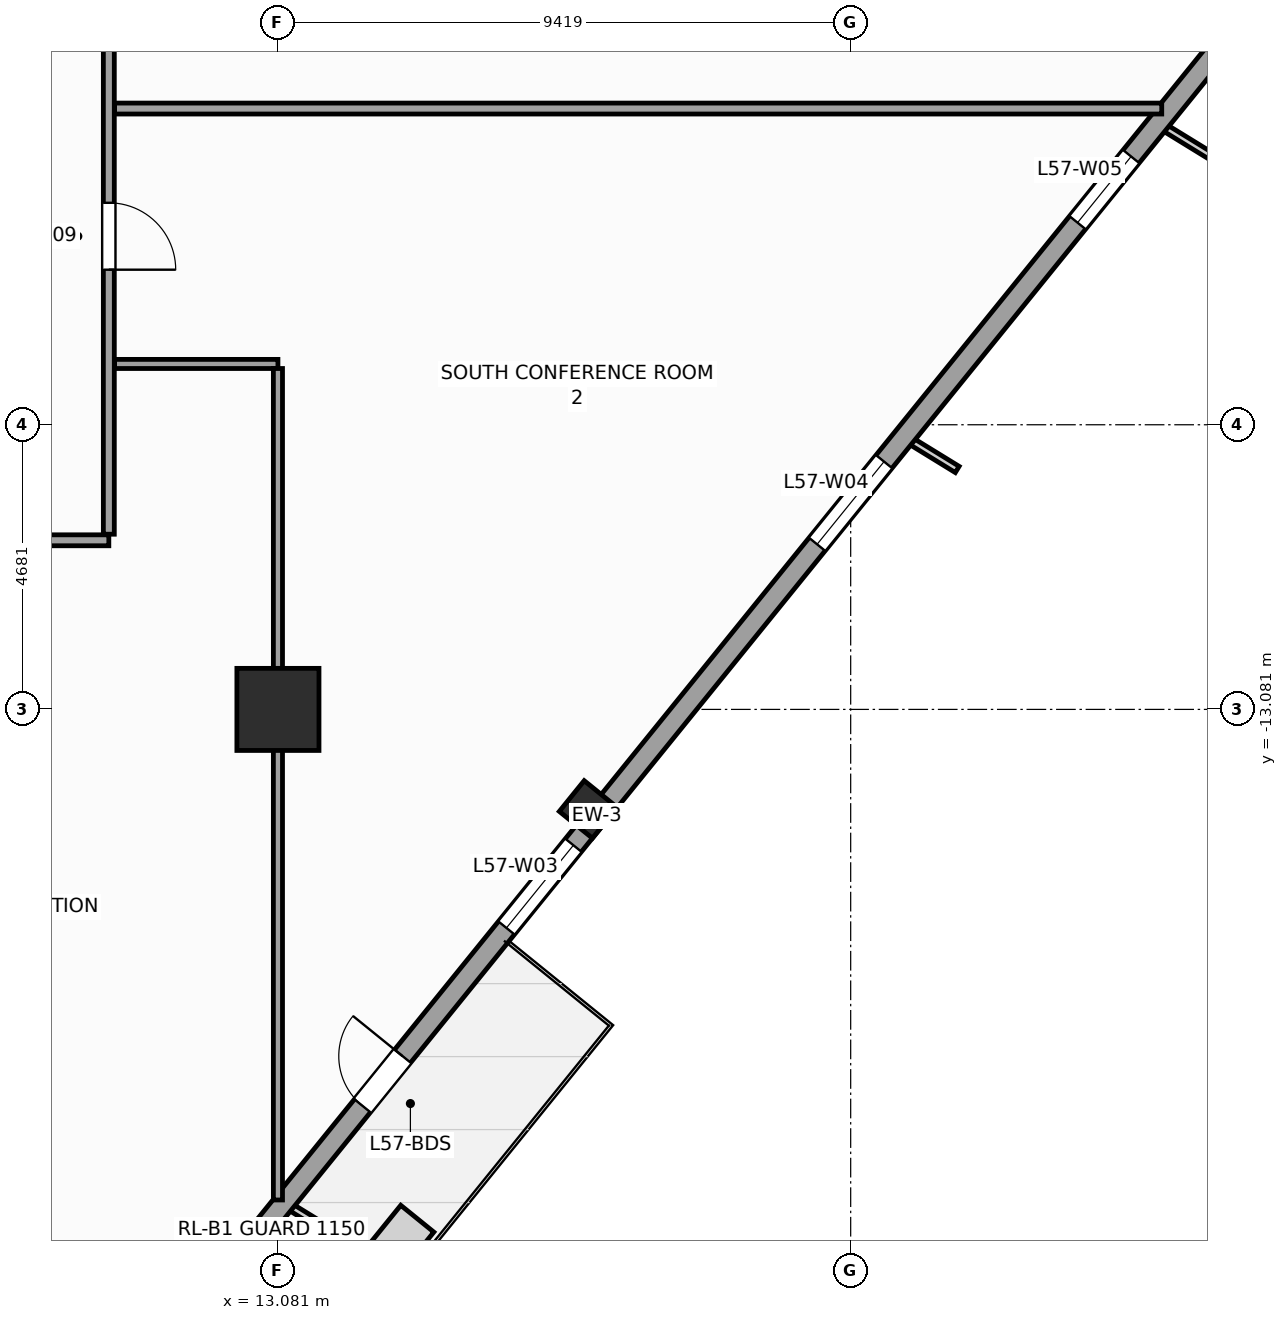
"""IFC4 building model, lengths in metres.
Left out: names, types, materials, properties, quantities, classifications, styles, units other than length and angle.
Written with IfcOpenShell. Run it as: python <this file> out.ifc"""

import sys

from ifc_helpers import new_model, si_unit, direction, frame, frame_2d, origin, origin_2d, place, context, subcontext, project, spatial, rectangle, extrude, source, transform, mapped, element, fill, save


model = new_model("IFC4")
c1 = context("Model", 3, precision=1e-05, world=origin(), true_north=direction((0.0, 1.0)))
c2 = subcontext(c1, "Body", "Model", "MODEL_VIEW")
j1 = project(units=[si_unit("LENGTHUNIT", "METRE"), si_unit("PLANEANGLEUNIT", "RADIAN")], contexts=[c1])
p1 = place(None, origin())
s1 = spatial("IfcSite", under=j1, at=p1, CompositionType="ELEMENT")
p2 = place(p1, origin())
s2 = spatial("IfcBuilding", under=s1, at=p2, CompositionType="ELEMENT")
p3 = place(p2, frame((0.0, 0.0, 236.8)))
s3 = spatial("IfcBuildingStorey", under=s2, at=p3, CompositionType="ELEMENT", Elevation=236.8)
m1 = source(origin(), c2, "Body", "SweptSolid", [
    extrude(rectangle(XDim=1.35, YDim=1.35, at=origin_2d()), origin(), (0.0, 0.0, 1.0), 3.9),
])
p4 = place(p3, frame((13.081, -13.081, 0.0), z_axis=(0.0, 0.0, 1.0), x_axis=(1.0, 0.0, 0.0)))
e1 = element("IfcColumn", 1, at=p4, inside=s3, PredefinedType="COLUMN", context=c2, shape_type="MappedRepresentation", body=[
    mapped(m1, transform((0.0, 0.0, 0.0), scale=1.0)),
])
m2 = source(origin(), c2, "Body", "SweptSolid", [
    extrude(rectangle(XDim=0.65, YDim=0.7, at=origin_2d()), origin(), (0.0, 0.0, 1.0), 3.9),
])
p5 = place(p3, frame((18.185, -14.726, 0.0), z_axis=(0.0, 0.0, 1.0), x_axis=(0.62932039105, 0.777145961457, 0.0)))
e2 = element("IfcColumn", 2, at=p5, inside=s3, PredefinedType="COLUMN", context=c2, shape_type="MappedRepresentation", body=[
    mapped(m2, transform((0.0, 0.0, 0.0), scale=1.0)),
])
p6 = place(p3, frame((6.733, -29.154, 0.0), z_axis=(0.0, 0.0, 1.0), x_axis=(0.629325378072, 0.77714192302, 0.0)))
e3 = element("IfcWall", 3, at=p6, inside=s3, PredefinedType="STANDARD", context=c2, shape_type="SweptSolid", body=[
    extrude(rectangle(XDim=36.84, YDim=0.34, at=frame_2d((18.42, 0.0))), origin(), (0.0, 0.0, 1.0), 2.96),
])
p7 = place(p6, frame((12.295, 0.0, 0.0)))
e4 = element("IfcOpeningElement", 4, at=p7, cuts=e3, PredefinedType="OPENING", context=c2, shape_type="SweptSolid", body=[
    extrude(rectangle(XDim=1.05, YDim=2.25, at=frame_2d((0.525, 1.125))), frame((0.0, 0.18, 0.0), z_axis=(0.0, -1.0, 0.0), x_axis=(1.0, 0.0, 0.0)), (0.0, 0.0, 1.0), 0.36),
])
p8 = place(p6, frame((3.721, 0.0, 0.48)))
e5 = element("IfcOpeningElement", 5, at=p8, cuts=e3, PredefinedType="OPENING", context=c2, shape_type="SweptSolid", body=[
    extrude(rectangle(XDim=1.4, YDim=2.4, at=frame_2d((0.7, 1.2))), frame((0.0, 0.18, 0.0), z_axis=(0.0, -1.0, 0.0), x_axis=(1.0, 0.0, 0.0)), (0.0, 0.0, 1.0), 0.36),
])
p9 = place(p6, frame((7.559, 0.0, 0.58)))
e6 = element("IfcOpeningElement", 6, at=p9, cuts=e3, PredefinedType="OPENING", context=c2, shape_type="SweptSolid", body=[
    extrude(rectangle(XDim=1.75, YDim=2.3, at=frame_2d((0.875, 1.15))), frame((0.0, 0.18, 0.0), z_axis=(0.0, -1.0, 0.0), x_axis=(1.0, 0.0, 0.0)), (0.0, 0.0, 1.0), 0.36),
])
p10 = place(p6, frame((16.058, 0.0, 0.58)))
e7 = element("IfcOpeningElement", 7, at=p10, cuts=e3, PredefinedType="OPENING", context=c2, shape_type="SweptSolid", body=[
    extrude(rectangle(XDim=1.75, YDim=2.3, at=frame_2d((0.875, 1.15))), frame((0.0, 0.18, 0.0), z_axis=(0.0, -1.0, 0.0), x_axis=(1.0, 0.0, 0.0)), (0.0, 0.0, 1.0), 0.36),
])
p11 = place(p6, frame((24.176, 0.0, 0.58)))
e8 = element("IfcOpeningElement", 8, at=p11, cuts=e3, PredefinedType="OPENING", context=c2, shape_type="SweptSolid", body=[
    extrude(rectangle(XDim=1.75, YDim=2.3, at=frame_2d((0.875, 1.15))), frame((0.0, 0.18, 0.0), z_axis=(0.0, -1.0, 0.0), x_axis=(1.0, 0.0, 0.0)), (0.0, 0.0, 1.0), 0.36),
])
p12 = place(p6, frame((30.982, 0.0, 0.48)))
e9 = element("IfcOpeningElement", 9, at=p12, cuts=e3, PredefinedType="OPENING", context=c2, shape_type="SweptSolid", body=[
    extrude(rectangle(XDim=1.4, YDim=2.4, at=frame_2d((0.7, 1.2))), frame((0.0, 0.18, 0.0), z_axis=(0.0, -1.0, 0.0), x_axis=(1.0, 0.0, 0.0)), (0.0, 0.0, 1.0), 0.36),
])
p13 = place(p3, frame((-11.4, -10.3, 0.0), z_axis=(0.0, 0.0, 1.0), x_axis=(1.0, 0.0, 0.0)))
e10 = element("IfcWall", 10, at=p13, inside=s3, PredefinedType="PARTITIONING", context=c2, shape_type="SweptSolid", body=[
    extrude(rectangle(XDim=21.7, YDim=0.18, at=frame_2d((10.85, 0.0))), origin(), (0.0, 0.0, 1.0), 3.66),
])
p14 = place(p13, frame((12.989, 0.0, 0.0)))
e11 = element("IfcOpeningElement", 11, at=p14, cuts=e10, PredefinedType="OPENING", context=c2, shape_type="SweptSolid", body=[
    extrude(rectangle(XDim=0.95, YDim=2.1, at=frame_2d((0.475, 1.05))), frame((0.0, 0.1, 0.0), z_axis=(0.0, -1.0, 0.0), x_axis=(1.0, 0.0, 0.0)), (0.0, 0.0, 1.0), 0.2),
])
p15 = place(p13, frame((17.585, 0.0, 0.0)))
e12 = element("IfcOpeningElement", 12, at=p15, cuts=e10, PredefinedType="OPENING", context=c2, shape_type="SweptSolid", body=[
    extrude(rectangle(XDim=1.1, YDim=2.2, at=frame_2d((0.55, 1.1))), frame((0.0, 0.1, 0.0), z_axis=(0.0, -1.0, 0.0), x_axis=(1.0, 0.0, 0.0)), (0.0, 0.0, 1.0), 0.2),
])
p16 = place(p13, frame((9.075, 0.0, 0.0)))
e13 = element("IfcOpeningElement", 13, at=p16, cuts=e10, PredefinedType="OPENING", context=c2, shape_type="SweptSolid", body=[
    extrude(rectangle(XDim=1.1, YDim=2.2, at=frame_2d((0.55, 1.1))), frame((0.0, 0.1, 0.0), z_axis=(0.0, -1.0, 0.0), x_axis=(1.0, 0.0, 0.0)), (0.0, 0.0, 1.0), 0.2),
])
p17 = place(p13, frame((3.724, 0.0, 0.0)))
e14 = element("IfcOpeningElement", 14, at=p17, cuts=e10, PredefinedType="OPENING", context=c2, shape_type="SweptSolid", body=[
    extrude(rectangle(XDim=1.1, YDim=2.2, at=frame_2d((0.55, 1.1))), frame((0.0, 0.1, 0.0), z_axis=(0.0, -1.0, 0.0), x_axis=(1.0, 0.0, 0.0)), (0.0, 0.0, 1.0), 0.2),
])
p18 = place(p3, frame((10.3, -10.2, 0.0), z_axis=(0.0, 0.0, 1.0), x_axis=(0.0, 1.0, 0.0)))
e15 = element("IfcWall", 15, at=p18, inside=s3, PredefinedType="PARTITIONING", context=c2, shape_type="SweptSolid", body=[
    extrude(rectangle(XDim=20.4, YDim=0.18, at=frame_2d((10.2, 0.0))), origin(), (0.0, 0.0, 1.0), 3.66),
])
p19 = place(p18, frame((14.95, 0.0, 0.0)))
e16 = element("IfcOpeningElement", 16, at=p19, cuts=e15, PredefinedType="OPENING", context=c2, shape_type="SweptSolid", body=[
    extrude(rectangle(XDim=1.1, YDim=2.2, at=frame_2d((0.55, 1.1))), frame((0.0, 0.1, 0.0), z_axis=(0.0, -1.0, 0.0), x_axis=(1.0, 0.0, 0.0)), (0.0, 0.0, 1.0), 0.2),
])
p20 = place(p18, frame((9.65, 0.0, 0.0)))
e17 = element("IfcOpeningElement", 17, at=p20, cuts=e15, PredefinedType="OPENING", context=c2, shape_type="SweptSolid", body=[
    extrude(rectangle(XDim=1.1, YDim=2.2, at=frame_2d((0.55, 1.1))), frame((0.0, 0.1, 0.0), z_axis=(0.0, -1.0, 0.0), x_axis=(1.0, 0.0, 0.0)), (0.0, 0.0, 1.0), 0.2),
])
p21 = place(p18, frame((4.35, 0.0, 0.0)))
e18 = element("IfcOpeningElement", 18, at=p21, cuts=e15, PredefinedType="OPENING", context=c2, shape_type="SweptSolid", body=[
    extrude(rectangle(XDim=1.1, YDim=2.2, at=frame_2d((0.55, 1.1))), frame((0.0, 0.1, 0.0), z_axis=(0.0, -1.0, 0.0), x_axis=(1.0, 0.0, 0.0)), (0.0, 0.0, 1.0), 0.2),
])
p22 = place(p3, frame((10.395, -3.2, 0.0), z_axis=(0.0, 0.0, 1.0), x_axis=(1.0, 0.0, 0.0)))
e19 = element("IfcWall", 19, at=p22, inside=s3, PredefinedType="PARTITIONING", context=c2, shape_type="SweptSolid", body=[
    extrude(rectangle(XDim=17.22, YDim=0.18, at=frame_2d((8.61, 0.0))), origin(), (0.0, 0.0, 1.0), 3.66),
])
p23 = place(p3, frame((10.395, -7.4, 0.0), z_axis=(0.0, 0.0, 1.0), x_axis=(1.0, 0.0, 0.0)))
e20 = element("IfcWall", 20, at=p23, inside=s3, PredefinedType="PARTITIONING", context=c2, shape_type="SweptSolid", body=[
    extrude(rectangle(XDim=2.686, YDim=0.15, at=frame_2d((1.343, 0.0))), origin(), (0.0, 0.0, 1.0), 3.66),
])
p24 = place(p3, frame((13.081, -7.475, 0.0), z_axis=(0.0, 0.0, 1.0), x_axis=(0.0, -1.0, 0.0)))
e21 = element("IfcWall", 21, at=p24, inside=s3, PredefinedType="PARTITIONING", context=c2, shape_type="SweptSolid", body=[
    extrude(rectangle(XDim=13.673, YDim=0.15, at=frame_2d((6.837, 0.0))), origin(), (0.0, 0.0, 1.0), 2.76),
])
m3 = source(origin(), c2, "Body", "SweptSolid", [
    extrude(rectangle(XDim=1.05, YDim=2.25, at=frame_2d((0.525, 1.125))), frame((0.0, 0.025, 0.0), z_axis=(0.0, -1.0, 0.0), x_axis=(1.0, 0.0, 0.0)), (0.0, 0.0, 1.0), 0.05),
])
p25 = place(p7, origin())
e22 = element("IfcDoor", 22, at=p25, inside=s3, OperationType="SINGLE_SWING_RIGHT", PredefinedType="DOOR", context=c2, shape_type="MappedRepresentation", body=[
    mapped(m3, transform((0.0, 0.0, 0.0), scale=1.0)),
])
fill(e4, e22)
m4 = source(origin(), c2, "Body", "SweptSolid", [
    extrude(rectangle(XDim=1.75, YDim=2.3, at=frame_2d((0.875, 1.15))), frame((0.0, 0.03, 0.0), z_axis=(0.0, -1.0, 0.0), x_axis=(1.0, 0.0, 0.0)), (0.0, 0.0, 1.0), 0.06),
])
p26 = place(p10, origin())
e23 = element("IfcWindow", 23, at=p26, inside=s3, PartitioningType="SINGLE_PANEL", PredefinedType="WINDOW", context=c2, shape_type="MappedRepresentation", body=[
    mapped(m4, transform((0.0, 0.0, 0.0), scale=1.0)),
])
fill(e7, e23)
p27 = place(p11, origin())
e24 = element("IfcWindow", 24, at=p27, inside=s3, PartitioningType="SINGLE_PANEL", PredefinedType="WINDOW", context=c2, shape_type="MappedRepresentation", body=[
    mapped(m4, transform((0.0, 0.0, 0.0), scale=1.0)),
])
fill(e8, e24)
m5 = source(origin(), c2, "Body", "SweptSolid", [
    extrude(rectangle(XDim=1.4, YDim=2.4, at=frame_2d((0.7, 1.2))), frame((0.0, 0.03, 0.0), z_axis=(0.0, -1.0, 0.0), x_axis=(1.0, 0.0, 0.0)), (0.0, 0.0, 1.0), 0.06),
])
p28 = place(p12, origin())
e25 = element("IfcWindow", 25, at=p28, inside=s3, PartitioningType="SINGLE_PANEL", PredefinedType="WINDOW", context=c2, shape_type="MappedRepresentation", body=[
    mapped(m5, transform((0.0, 0.0, 0.0), scale=1.0)),
])
fill(e9, e25)
m6 = source(origin(), c2, "Body", "SweptSolid", [
    extrude(rectangle(XDim=1.1, YDim=2.2, at=frame_2d((0.55, 1.1))), frame((0.0, 0.025, 0.0), z_axis=(0.0, -1.0, 0.0), x_axis=(1.0, 0.0, 0.0)), (0.0, 0.0, 1.0), 0.05),
])
p29 = place(p21, frame((1.1, 0.0, 0.0), z_axis=(0.0, 0.0, 1.0), x_axis=(-1.0, 0.0, 0.0)))
e26 = element("IfcDoor", 26, at=p29, inside=s3, OperationType="SINGLE_SWING_LEFT", PredefinedType="DOOR", context=c2, shape_type="MappedRepresentation", body=[
    mapped(m6, transform((0.0, 0.0, 0.0), scale=1.0)),
])
fill(e18, e26)
save(model, sys.argv[1])
